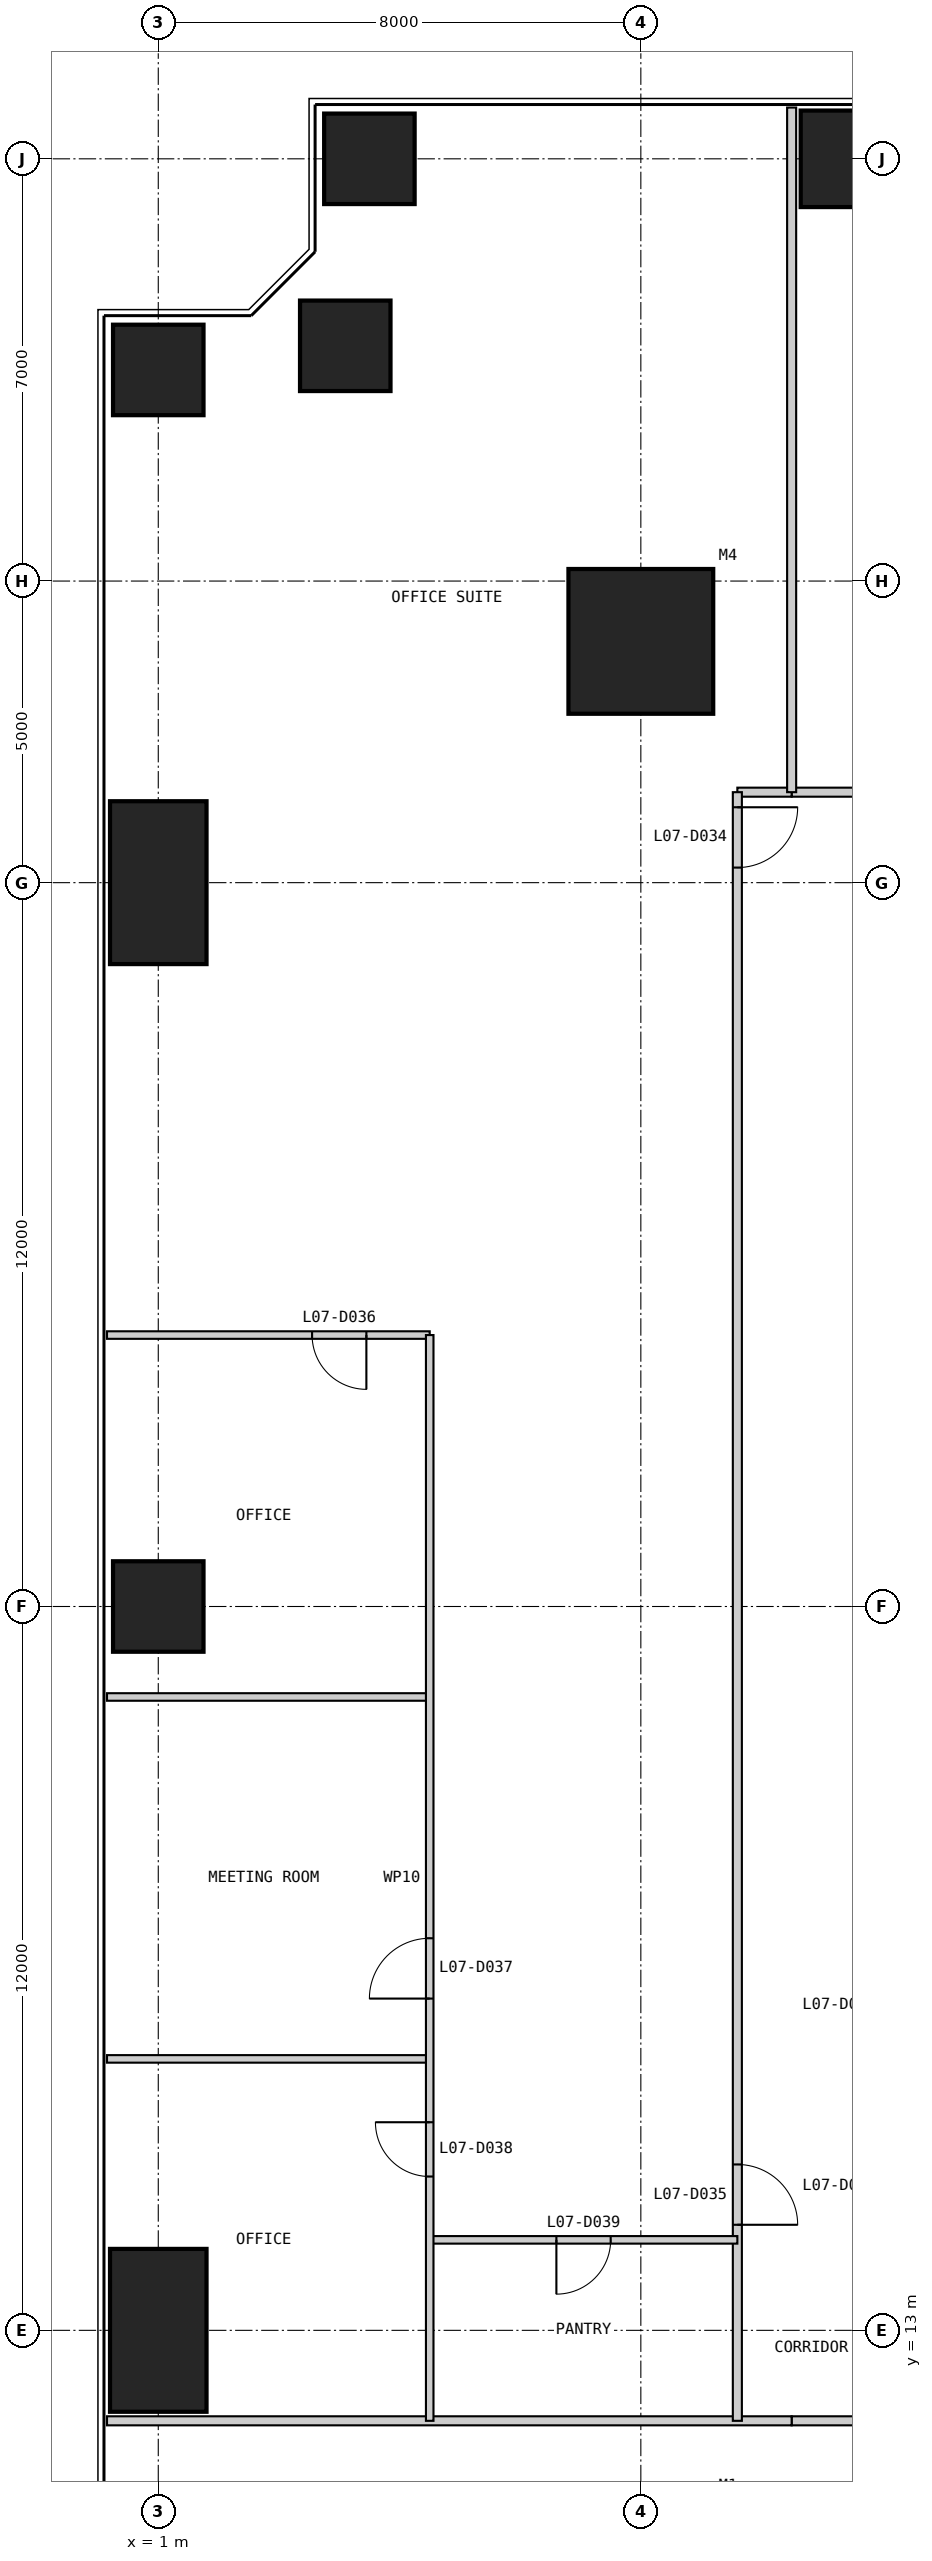
"""IFC4 building model, lengths in metres.
Left out: names, types, materials, properties, quantities, classifications, styles, units other than length and angle.
Written with IfcOpenShell. Run it as: python <this file> out.ifc"""

import sys

from ifc_helpers import new_model, si_unit, direction, frame, frame_2d, origin, origin_2d, place, context, subcontext, project, spatial, rectangle, extrude, element, fill, save


model = new_model("IFC4")
c1 = context("Model", 3, precision=1e-05, world=origin(), true_north=direction((0.0, 1.0)))
c2 = subcontext(c1, "Body", "Model", "MODEL_VIEW")
j1 = project(units=[si_unit("LENGTHUNIT", "METRE"), si_unit("PLANEANGLEUNIT", "RADIAN")], contexts=[c1])
p1 = place(None, origin())
s1 = spatial("IfcSite", under=j1, at=p1, CompositionType="ELEMENT")
p2 = place(p1, origin())
s2 = spatial("IfcBuilding", under=s1, at=p2, CompositionType="ELEMENT")
p3 = place(p2, frame((0.0, 0.0, 35.0)))
s3 = spatial("IfcBuildingStorey", under=s2, at=p3, CompositionType="ELEMENT", Elevation=35.0)
p4 = place(p3, frame((9.0, 41.0, 0.0), z_axis=(0.0, 0.0, 1.0), x_axis=(1.0, 0.0, 0.0)))
e1 = element("IfcColumn", 1, at=p4, inside=s3, PredefinedType="COLUMN", context=c2, shape_type="SweptSolid", body=[
    extrude(rectangle(XDim=2.4, YDim=2.4, at=origin_2d()), origin(), (0.0, 0.0, 1.0), 4.0),
])
p5 = place(p3, frame((13.0, 49.0, 0.0), z_axis=(0.0, 0.0, 1.0), x_axis=(1.0, 0.0, 0.0)))
e2 = element("IfcColumn", 2, at=p5, inside=s3, PredefinedType="COLUMN", context=c2, shape_type="SweptSolid", body=[
    extrude(rectangle(XDim=2.7, YDim=1.6, at=origin_2d()), origin(), (0.0, 0.0, 1.0), 4.0),
])
for number, where, z_axis, x_axis in (
    (3, (4.5, 49.0, 0.0), (0.0, 0.0, 1.0), (1.0, 0.0, 0.0)),
    (4, (4.1, 45.9, 0.0), (0.0, 0.0, 1.0), (1.0, 0.0, 0.0)),
    (5, (1.0, 45.5, 0.0), (0.0, 0.0, 1.0), (1.0, 0.0, 0.0)),
):
    element("IfcColumn", number, at=place(p3, frame(where, z_axis=z_axis, x_axis=x_axis)), inside=s3, PredefinedType="COLUMN", context=c2, shape_type="SweptSolid", body=[
        extrude(rectangle(XDim=1.5, YDim=1.5, at=origin_2d()), origin(), (0.0, 0.0, 1.0), 4.0),
    ])
p6 = place(p3, frame((1.0, 37.0, 0.0), z_axis=(0.0, 0.0, 1.0), x_axis=(1.0, 0.0, 0.0)))
e6 = element("IfcColumn", 6, at=p6, inside=s3, PredefinedType="COLUMN", context=c2, shape_type="SweptSolid", body=[
    extrude(rectangle(XDim=1.6, YDim=2.7, at=origin_2d()), origin(), (0.0, 0.0, 1.0), 4.0),
])
p7 = place(p3, frame((1.0, 25.0, 0.0), z_axis=(0.0, 0.0, 1.0), x_axis=(1.0, 0.0, 0.0)))
e7 = element("IfcColumn", 7, at=p7, inside=s3, PredefinedType="COLUMN", context=c2, shape_type="SweptSolid", body=[
    extrude(rectangle(XDim=1.5, YDim=1.5, at=origin_2d()), origin(), (0.0, 0.0, 1.0), 4.0),
])
p8 = place(p3, frame((1.0, 13.0, 0.0), z_axis=(0.0, 0.0, 1.0), x_axis=(1.0, 0.0, 0.0)))
e8 = element("IfcColumn", 8, at=p8, inside=s3, PredefinedType="COLUMN", context=c2, shape_type="SweptSolid", body=[
    extrude(rectangle(XDim=1.6, YDim=2.7, at=origin_2d()), origin(), (0.0, 0.0, 1.0), 4.0),
])
p9 = place(p3, frame((11.5, 11.5, 0.0), z_axis=(0.0, 0.0, 1.0), x_axis=(1.0, 0.0, 0.0)))
e9 = element("IfcWall", 9, at=p9, inside=s3, PredefinedType="PARTITIONING", context=c2, shape_type="SweptSolid", body=[
    extrude(rectangle(XDim=27.0, YDim=0.15, at=frame_2d((13.5, 0.0))), origin(), (0.0, 0.0, 1.0), 3.85),
])
p10 = place(p9, frame((4.0, 0.0, 0.0)))
e10 = element("IfcOpeningElement", 10, at=p10, cuts=e9, PredefinedType="OPENING", context=c2, shape_type="SweptSolid", body=[
    extrude(rectangle(XDim=1.0, YDim=2.2, at=frame_2d((0.5, 1.1))), frame((0.0, 0.085, 0.0), z_axis=(0.0, -1.0, 0.0), x_axis=(1.0, 0.0, 0.0)), (0.0, 0.0, 1.0), 0.17),
])
p11 = place(p9, frame((10.0, 0.0, 0.0)))
e11 = element("IfcOpeningElement", 11, at=p11, cuts=e9, PredefinedType="OPENING", context=c2, shape_type="SweptSolid", body=[
    extrude(rectangle(XDim=1.0, YDim=2.2, at=frame_2d((0.5, 1.1))), frame((0.0, 0.085, 0.0), z_axis=(0.0, -1.0, 0.0), x_axis=(1.0, 0.0, 0.0)), (0.0, 0.0, 1.0), 0.17),
])
p12 = place(p9, frame((17.5, 0.0, 0.0)))
e12 = element("IfcOpeningElement", 12, at=p12, cuts=e9, PredefinedType="OPENING", context=c2, shape_type="SweptSolid", body=[
    extrude(rectangle(XDim=1.0, YDim=2.2, at=frame_2d((0.5, 1.1))), frame((0.0, 0.085, 0.0), z_axis=(0.0, -1.0, 0.0), x_axis=(1.0, 0.0, 0.0)), (0.0, 0.0, 1.0), 0.17),
])
p13 = place(p9, frame((23.5, 0.0, 0.0)))
e13 = element("IfcOpeningElement", 13, at=p13, cuts=e9, PredefinedType="OPENING", context=c2, shape_type="SweptSolid", body=[
    extrude(rectangle(XDim=1.0, YDim=2.2, at=frame_2d((0.5, 1.1))), frame((0.0, 0.085, 0.0), z_axis=(0.0, -1.0, 0.0), x_axis=(1.0, 0.0, 0.0)), (0.0, 0.0, 1.0), 0.17),
])
p14 = place(p3, frame((0.15, 11.5, 0.0), z_axis=(0.0, 0.0, 1.0), x_axis=(1.0, 0.0, 0.0)))
e14 = element("IfcWall", 14, at=p14, inside=s3, PredefinedType="PARTITIONING", context=c2, shape_type="SweptSolid", body=[
    extrude(rectangle(XDim=11.35, YDim=0.15, at=frame_2d((5.675, 0.0))), origin(), (0.0, 0.0, 1.0), 3.85),
])
p15 = place(p3, frame((38.5, 38.5, 0.0), z_axis=(0.0, 0.0, 1.0), x_axis=(-1.0, 0.0, 0.0)))
e15 = element("IfcWall", 15, at=p15, inside=s3, PredefinedType="PARTITIONING", context=c2, shape_type="SweptSolid", body=[
    extrude(rectangle(XDim=27.0, YDim=0.15, at=frame_2d((13.5, 0.0))), origin(), (0.0, 0.0, 1.0), 3.85),
])
p16 = place(p15, frame((2.5, 0.0, 0.0)))
e16 = element("IfcOpeningElement", 16, at=p16, cuts=e15, PredefinedType="OPENING", context=c2, shape_type="SweptSolid", body=[
    extrude(rectangle(XDim=1.0, YDim=2.2, at=frame_2d((0.5, 1.1))), frame((0.0, 0.085, 0.0), z_axis=(0.0, -1.0, 0.0), x_axis=(1.0, 0.0, 0.0)), (0.0, 0.0, 1.0), 0.17),
])
p17 = place(p15, frame((13.0, 0.0, 0.0)))
e17 = element("IfcOpeningElement", 17, at=p17, cuts=e15, PredefinedType="OPENING", context=c2, shape_type="SweptSolid", body=[
    extrude(rectangle(XDim=1.0, YDim=2.2, at=frame_2d((0.5, 1.1))), frame((0.0, 0.085, 0.0), z_axis=(0.0, -1.0, 0.0), x_axis=(1.0, 0.0, 0.0)), (0.0, 0.0, 1.0), 0.17),
])
p18 = place(p15, frame((23.5, 0.0, 0.0)))
e18 = element("IfcOpeningElement", 18, at=p18, cuts=e15, PredefinedType="OPENING", context=c2, shape_type="SweptSolid", body=[
    extrude(rectangle(XDim=1.0, YDim=2.2, at=frame_2d((0.5, 1.1))), frame((0.0, 0.085, 0.0), z_axis=(0.0, -1.0, 0.0), x_axis=(1.0, 0.0, 0.0)), (0.0, 0.0, 1.0), 0.17),
])
p19 = place(p3, frame((11.5, 38.5, 0.0), z_axis=(0.0, 0.0, 1.0), x_axis=(-1.0, 0.0, 0.0)))
e19 = element("IfcWall", 19, at=p19, inside=s3, PredefinedType="PARTITIONING", context=c2, shape_type="SweptSolid", body=[
    extrude(rectangle(XDim=0.9, YDim=0.15, at=frame_2d((0.45, 0.0))), origin(), (0.0, 0.0, 1.0), 3.85),
])
p20 = place(p3, frame((10.6, 38.5, 0.0), z_axis=(0.0, 0.0, 1.0), x_axis=(0.0, -1.0, 0.0)))
e20 = element("IfcWall", 20, at=p20, inside=s3, PredefinedType="PARTITIONING", context=c2, shape_type="SweptSolid", body=[
    extrude(rectangle(XDim=27.0, YDim=0.15, at=frame_2d((13.5, 0.0))), origin(), (0.0, 0.0, 1.0), 3.85),
])
p21 = place(p20, frame((0.25, 0.0, 0.0)))
e21 = element("IfcOpeningElement", 21, at=p21, cuts=e20, PredefinedType="OPENING", context=c2, shape_type="SweptSolid", body=[
    extrude(rectangle(XDim=1.0, YDim=2.2, at=frame_2d((0.5, 1.1))), frame((0.0, 0.085, 0.0), z_axis=(0.0, -1.0, 0.0), x_axis=(1.0, 0.0, 0.0)), (0.0, 0.0, 1.0), 0.17),
])
p22 = place(p20, frame((22.75, 0.0, 0.0)))
e22 = element("IfcOpeningElement", 22, at=p22, cuts=e20, PredefinedType="OPENING", context=c2, shape_type="SweptSolid", body=[
    extrude(rectangle(XDim=1.0, YDim=2.2, at=frame_2d((0.5, 1.1))), frame((0.0, 0.085, 0.0), z_axis=(0.0, -1.0, 0.0), x_axis=(1.0, 0.0, 0.0)), (0.0, 0.0, 1.0), 0.17),
])
p23 = place(p3, frame((11.5, 49.85, 0.0), z_axis=(0.0, 0.0, 1.0), x_axis=(0.0, -1.0, 0.0)))
e23 = element("IfcWall", 23, at=p23, inside=s3, PredefinedType="PARTITIONING", context=c2, shape_type="SweptSolid", body=[
    extrude(rectangle(XDim=11.35, YDim=0.15, at=frame_2d((5.675, 0.0))), origin(), (0.0, 0.0, 1.0), 3.85),
])
p24 = place(p3, frame((0.15, 29.5, 0.0), z_axis=(0.0, 0.0, 1.0), x_axis=(1.0, 0.0, 0.0)))
e24 = element("IfcWall", 24, at=p24, inside=s3, PredefinedType="PARTITIONING", context=c2, shape_type="SweptSolid", body=[
    extrude(rectangle(XDim=5.35, YDim=0.125, at=frame_2d((2.675, 0.0))), origin(), (0.0, 0.0, 1.0), 3.85),
])
p25 = place(p24, frame((3.4, 0.0, 0.0)))
e25 = element("IfcOpeningElement", 25, at=p25, cuts=e24, PredefinedType="OPENING", context=c2, shape_type="SweptSolid", body=[
    extrude(rectangle(XDim=0.9, YDim=2.2, at=frame_2d((0.45, 1.1))), frame((0.0, 0.073, 0.0), z_axis=(0.0, -1.0, 0.0), x_axis=(1.0, 0.0, 0.0)), (0.0, 0.0, 1.0), 0.145),
])
for number, where, z_axis, x_axis in (
    (26, (0.15, 23.5, 0.0), (0.0, 0.0, 1.0), (1.0, 0.0, 0.0)),
    (27, (0.15, 17.5, 0.0), (0.0, 0.0, 1.0), (1.0, 0.0, 0.0)),
):
    element("IfcWall", number, at=place(p3, frame(where, z_axis=z_axis, x_axis=x_axis)), inside=s3, PredefinedType="PARTITIONING", context=c2, shape_type="SweptSolid", body=[
        extrude(rectangle(XDim=5.35, YDim=0.125, at=frame_2d((2.675, 0.0))), origin(), (0.0, 0.0, 1.0), 3.85),
    ])
p26 = place(p3, frame((5.5, 14.5, 0.0), z_axis=(0.0, 0.0, 1.0), x_axis=(1.0, 0.0, 0.0)))
e28 = element("IfcWall", 28, at=p26, inside=s3, PredefinedType="PARTITIONING", context=c2, shape_type="SweptSolid", body=[
    extrude(rectangle(XDim=5.1, YDim=0.125, at=frame_2d((2.55, 0.0))), origin(), (0.0, 0.0, 1.0), 3.85),
])
p27 = place(p26, frame((2.1, 0.0, 0.0)))
e29 = element("IfcOpeningElement", 29, at=p27, cuts=e28, PredefinedType="OPENING", context=c2, shape_type="SweptSolid", body=[
    extrude(rectangle(XDim=0.9, YDim=2.2, at=frame_2d((0.45, 1.1))), frame((0.0, 0.073, 0.0), z_axis=(0.0, -1.0, 0.0), x_axis=(1.0, 0.0, 0.0)), (0.0, 0.0, 1.0), 0.145),
])
p28 = place(p3, frame((5.5, 29.5, 0.0), z_axis=(0.0, 0.0, 1.0), x_axis=(0.0, -1.0, 0.0)))
e30 = element("IfcWall", 30, at=p28, inside=s3, PredefinedType="PARTITIONING", context=c2, shape_type="SweptSolid", body=[
    extrude(rectangle(XDim=18.0, YDim=0.125, at=frame_2d((9.0, 0.0))), origin(), (0.0, 0.0, 1.0), 3.85),
])
p29 = place(p28, frame((10.0, 0.0, 0.0)))
e31 = element("IfcOpeningElement", 31, at=p29, cuts=e30, PredefinedType="OPENING", context=c2, shape_type="SweptSolid", body=[
    extrude(rectangle(XDim=1.0, YDim=2.2, at=frame_2d((0.5, 1.1))), frame((0.0, 0.073, 0.0), z_axis=(0.0, -1.0, 0.0), x_axis=(1.0, 0.0, 0.0)), (0.0, 0.0, 1.0), 0.145),
])
p30 = place(p28, frame((13.05, 0.0, 0.0)))
e32 = element("IfcOpeningElement", 32, at=p30, cuts=e30, PredefinedType="OPENING", context=c2, shape_type="SweptSolid", body=[
    extrude(rectangle(XDim=0.9, YDim=2.2, at=frame_2d((0.45, 1.1))), frame((0.0, 0.073, 0.0), z_axis=(0.0, -1.0, 0.0), x_axis=(1.0, 0.0, 0.0)), (0.0, 0.0, 1.0), 0.145),
])
p31 = place(p21, origin())
e33 = element("IfcDoor", 33, at=p31, inside=s3, OperationType="SINGLE_SWING_LEFT", PredefinedType="DOOR", context=c2, shape_type="SweptSolid", body=[
    extrude(rectangle(XDim=1.0, YDim=2.2, at=frame_2d((0.5, 1.1))), frame((0.0, 0.025, 0.0), z_axis=(0.0, -1.0, 0.0), x_axis=(1.0, 0.0, 0.0)), (0.0, 0.0, 1.0), 0.05),
])
fill(e21, e33)
p32 = place(p22, origin())
e34 = element("IfcDoor", 34, at=p32, inside=s3, OperationType="SINGLE_SWING_RIGHT", PredefinedType="DOOR", context=c2, shape_type="SweptSolid", body=[
    extrude(rectangle(XDim=1.0, YDim=2.2, at=frame_2d((0.5, 1.1))), frame((0.0, 0.025, 0.0), z_axis=(0.0, -1.0, 0.0), x_axis=(1.0, 0.0, 0.0)), (0.0, 0.0, 1.0), 0.05),
])
fill(e22, e34)
p33 = place(p25, frame((0.9, 0.0, 0.0), z_axis=(0.0, 0.0, 1.0), x_axis=(-1.0, 0.0, 0.0)))
e35 = element("IfcDoor", 35, at=p33, inside=s3, OperationType="SINGLE_SWING_LEFT", PredefinedType="DOOR", context=c2, shape_type="SweptSolid", body=[
    extrude(rectangle(XDim=0.9, YDim=2.2, at=frame_2d((0.45, 1.1))), frame((0.0, 0.025, 0.0), z_axis=(0.0, -1.0, 0.0), x_axis=(1.0, 0.0, 0.0)), (0.0, 0.0, 1.0), 0.05),
])
fill(e25, e35)
p34 = place(p29, frame((1.0, 0.0, 0.0), z_axis=(0.0, 0.0, 1.0), x_axis=(-1.0, 0.0, 0.0)))
e36 = element("IfcDoor", 36, at=p34, inside=s3, OperationType="SINGLE_SWING_LEFT", PredefinedType="DOOR", context=c2, shape_type="SweptSolid", body=[
    extrude(rectangle(XDim=1.0, YDim=2.2, at=frame_2d((0.5, 1.1))), frame((0.0, 0.025, 0.0), z_axis=(0.0, -1.0, 0.0), x_axis=(1.0, 0.0, 0.0)), (0.0, 0.0, 1.0), 0.05),
])
fill(e31, e36)
p35 = place(p30, frame((0.9, 0.0, 0.0), z_axis=(0.0, 0.0, 1.0), x_axis=(-1.0, 0.0, 0.0)))
e37 = element("IfcDoor", 37, at=p35, inside=s3, OperationType="SINGLE_SWING_RIGHT", PredefinedType="DOOR", context=c2, shape_type="SweptSolid", body=[
    extrude(rectangle(XDim=0.9, YDim=2.2, at=frame_2d((0.45, 1.1))), frame((0.0, 0.025, 0.0), z_axis=(0.0, -1.0, 0.0), x_axis=(1.0, 0.0, 0.0)), (0.0, 0.0, 1.0), 0.05),
])
fill(e32, e37)
p36 = place(p27, frame((0.9, 0.0, 0.0), z_axis=(0.0, 0.0, 1.0), x_axis=(-1.0, 0.0, 0.0)))
e38 = element("IfcDoor", 38, at=p36, inside=s3, OperationType="SINGLE_SWING_RIGHT", PredefinedType="DOOR", context=c2, shape_type="SweptSolid", body=[
    extrude(rectangle(XDim=0.9, YDim=2.2, at=frame_2d((0.45, 1.1))), frame((0.0, 0.025, 0.0), z_axis=(0.0, -1.0, 0.0), x_axis=(1.0, 0.0, 0.0)), (0.0, 0.0, 1.0), 0.05),
])
fill(e29, e38)
save(model, sys.argv[1])
